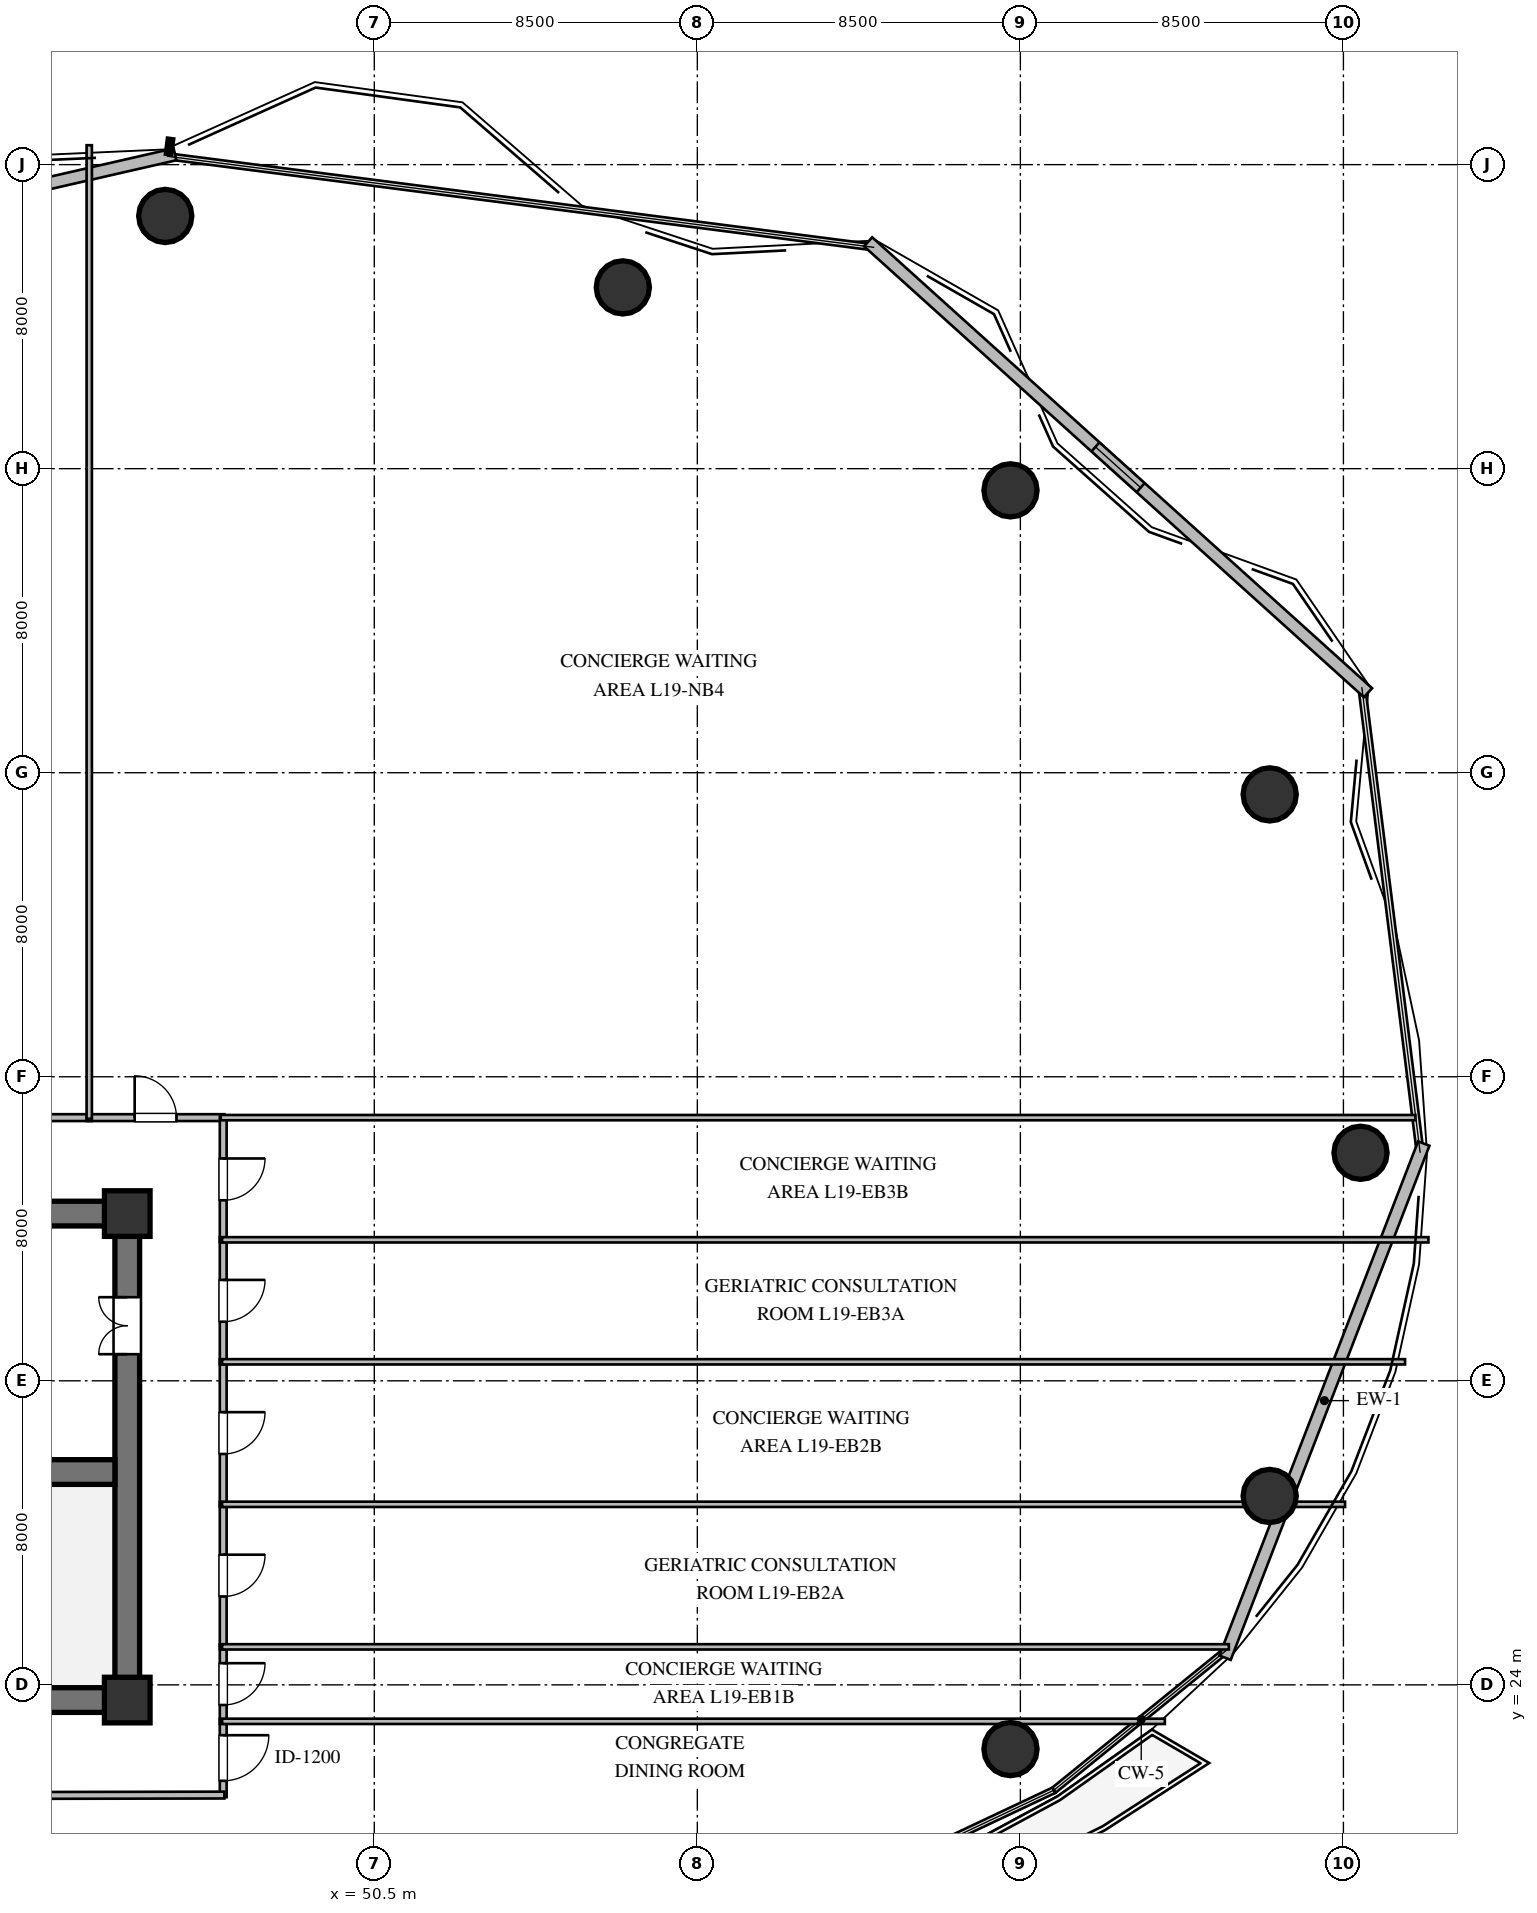
"""IFC4 building model, lengths in metres.
Left out: names, types, materials, properties, quantities, classifications, styles, units other than length and angle.
Written with IfcOpenShell. Run it as: python <this file> out.ifc"""

import sys

from ifc_helpers import new_model, si_unit, direction, frame, frame_2d, origin, origin_2d, place, context, subcontext, project, spatial, rectangle, circle, extrude, element, fill, save


model = new_model("IFC4")
c1 = context("Model", 3, precision=1e-05, world=origin(), true_north=direction((0.0, 1.0)))
c2 = subcontext(c1, "Body", "Model", "MODEL_VIEW")
j1 = project(units=[si_unit("LENGTHUNIT", "METRE"), si_unit("PLANEANGLEUNIT", "RADIAN")], contexts=[c1])
p1 = place(None, origin())
s1 = spatial("IfcSite", under=j1, at=p1, CompositionType="ELEMENT")
p2 = place(p1, origin())
s2 = spatial("IfcBuilding", under=s1, at=p2, CompositionType="ELEMENT")
p3 = place(p2, frame((0.0, 0.0, 74.4)))
s3 = spatial("IfcBuildingStorey", under=s2, at=p3, CompositionType="ELEMENT", Elevation=74.4)
for number, where, z_axis, x_axis in (
    (1, (21.675, 23.6, 0.0), (0.0, 0.0, 1.0), (1.0, 0.0, 0.0)),
    (2, (21.675, 36.4, 0.0), (0.0, 0.0, 1.0), (1.0, 0.0, 0.0)),
):
    element("IfcWall", number, at=place(p3, frame(where, z_axis=z_axis, x_axis=x_axis)), inside=s3, PredefinedType="SHEAR", context=c2, shape_type="SweptSolid", body=[
        extrude(rectangle(XDim=22.65, YDim=0.65, at=frame_2d((11.325, 0.0))), origin(), (0.0, 0.0, 1.0), 3.36),
    ])
p4 = place(p3, frame((44.0, 23.925, 0.0), z_axis=(0.0, 0.0, 1.0), x_axis=(0.0, 1.0, 0.0)))
e3 = element("IfcWall", 3, at=p4, inside=s3, PredefinedType="SHEAR", context=c2, shape_type="SweptSolid", body=[
    extrude(rectangle(XDim=12.15, YDim=0.65, at=frame_2d((6.075, 0.0))), origin(), (0.0, 0.0, 1.0), 3.36),
])
p5 = place(p4, frame((8.775, 0.0, 0.0)))
e4 = element("IfcOpeningElement", 4, at=p5, cuts=e3, PredefinedType="OPENING", context=c2, shape_type="SweptSolid", body=[
    extrude(rectangle(XDim=1.5, YDim=2.15, at=frame_2d((0.75, 1.075))), frame((0.0, 0.335, 0.0), z_axis=(0.0, -1.0, 0.0), x_axis=(1.0, 0.0, 0.0)), (0.0, 0.0, 1.0), 0.67),
])
p6 = place(p3, frame((22.325, 29.6, 0.0), z_axis=(0.0, 0.0, 1.0), x_axis=(1.0, 0.0, 0.0)))
e5 = element("IfcWall", 5, at=p6, inside=s3, PredefinedType="SHEAR", context=c2, shape_type="SweptSolid", body=[
    extrude(rectangle(XDim=21.35, YDim=0.65, at=frame_2d((10.675, 0.0))), origin(), (0.0, 0.0, 1.0), 3.36),
])
p7 = place(p6, frame((12.125, 0.0, 0.0)))
e6 = element("IfcOpeningElement", 6, at=p7, cuts=e5, PredefinedType="OPENING", context=c2, shape_type="SweptSolid", body=[
    extrude(rectangle(XDim=1.15, YDim=2.1, at=frame_2d((0.575, 1.05))), frame((0.0, 0.335, 0.0), z_axis=(0.0, -1.0, 0.0), x_axis=(1.0, 0.0, 0.0)), (0.0, 0.0, 1.0), 0.67),
])
for number, where, z_axis, x_axis in (
    (7, (44.0, 23.6, 0.0), (0.0, 0.0, 1.0), (1.0, 0.0, 0.0)),
    (8, (44.0, 36.4, 0.0), (0.0, 0.0, 1.0), (1.0, 0.0, 0.0)),
):
    element("IfcColumn", number, at=place(p3, frame(where, z_axis=z_axis, x_axis=x_axis)), inside=s3, PredefinedType="COLUMN", context=c2, shape_type="SweptSolid", body=[
        extrude(rectangle(XDim=1.2, YDim=1.2, at=origin_2d()), origin(), (0.0, 0.0, 1.0), 3.6),
    ])
for number, where, z_axis, x_axis in (
    (9, (76.45, 38.0, 0.0), (0.0, 0.0, 1.0), (1.0, 0.0, 0.0)),
    (10, (74.06, 47.43, 0.0), (0.0, 0.0, 1.0), (1.0, 0.0, 0.0)),
    (11, (67.24, 55.43, 0.0), (0.0, 0.0, 1.0), (1.0, 0.0, 0.0)),
    (12, (57.04, 60.77, 0.0), (0.0, 0.0, 1.0), (1.0, 0.0, 0.0)),
    (13, (45.0, 62.65, 0.0), (0.0, 0.0, 1.0), (1.0, 0.0, 0.0)),
    (14, (67.24, 22.31, 0.0), (0.0, 0.0, 1.0), (1.0, 0.0, 0.0)),
    (15, (74.06, 28.97, 0.0), (0.0, 0.0, 1.0), (1.0, 0.0, 0.0)),
):
    element("IfcColumn", number, at=place(p3, frame(where, z_axis=z_axis, x_axis=x_axis)), inside=s3, PredefinedType="COLUMN", context=c2, shape_type="SweptSolid", body=[
        extrude(circle(Radius=0.7, at=origin_2d()), origin(), (0.0, 0.0, 1.0), 3.6),
    ])
p8 = place(p3, frame((78.114, 38.243, 0.0), z_axis=(0.0, 0.0, 1.0), x_axis=(-0.360517110943, -0.932752599952, 0.0)))
e16 = element("IfcWall", 16, at=p8, inside=s3, PredefinedType="STANDARD", context=c2, shape_type="SweptSolid", body=[
    extrude(rectangle(XDim=14.504, YDim=0.32, at=frame_2d((7.252, 0.0))), origin(), (0.0, 0.0, 1.0), 2.738),
])
p9 = place(p3, frame((27.164, 60.126, 0.0), z_axis=(0.0, 0.0, 1.0), x_axis=(0.974744906433, 0.22332122018, 0.0)))
e17 = element("IfcWall", 17, at=p9, inside=s3, PredefinedType="STANDARD", context=c2, shape_type="SweptSolid", body=[
    extrude(rectangle(XDim=18.561, YDim=0.32, at=frame_2d((9.28, 0.0))), origin(), (0.0, 0.0, 1.0), 3.36),
])
p10 = place(p9, frame((8.481, 0.0, 1.05)))
e18 = element("IfcOpeningElement", 18, at=p10, cuts=e17, PredefinedType="OPENING", context=c2, shape_type="SweptSolid", body=[
    extrude(rectangle(XDim=1.6, YDim=1.5, at=frame_2d((0.8, 0.75))), frame((0.0, 0.17, 0.0), z_axis=(0.0, -1.0, 0.0), x_axis=(1.0, 0.0, 0.0)), (0.0, 0.0, 1.0), 0.34),
])
p11 = place(p3, frame((63.494, 61.969, 0.0), z_axis=(0.0, 0.0, 1.0), x_axis=(0.7425569544, -0.669782927128, 0.0)))
e19 = element("IfcWall", 19, at=p11, inside=s3, PredefinedType="STANDARD", context=c2, shape_type="SweptSolid", body=[
    extrude(rectangle(XDim=17.713, YDim=0.32, at=frame_2d((8.856, 0.0))), origin(), (0.0, 0.0, 1.0), 3.36),
])
p12 = place(p11, frame((8.057, 0.0, 1.05)))
e20 = element("IfcOpeningElement", 20, at=p12, cuts=e19, PredefinedType="OPENING", context=c2, shape_type="SweptSolid", body=[
    extrude(rectangle(XDim=1.6, YDim=1.5, at=frame_2d((0.8, 0.75))), frame((0.0, 0.17, 0.0), z_axis=(0.0, -1.0, 0.0), x_axis=(1.0, 0.0, 0.0)), (0.0, 0.0, 1.0), 0.34),
])
p13 = place(p3, frame((37.935, 38.925, 0.0), z_axis=(0.0, 0.0, 1.0), x_axis=(1.0, 0.0, 0.0)))
e21 = element("IfcWall", 21, at=p13, inside=s3, PredefinedType="PARTITIONING", context=c2, shape_type="SweptSolid", body=[
    extrude(rectangle(XDim=5.13, YDim=0.18, at=frame_2d((2.565, 0.0))), origin(), (0.0, 0.0, 1.0), 3.36),
])
p14 = place(p13, frame((2.015, 0.0, 0.0)))
e22 = element("IfcOpeningElement", 22, at=p14, cuts=e21, PredefinedType="OPENING", context=c2, shape_type="SweptSolid", body=[
    extrude(rectangle(XDim=1.1, YDim=2.1, at=frame_2d((0.55, 1.05))), frame((0.0, 0.1, 0.0), z_axis=(0.0, -1.0, 0.0), x_axis=(1.0, 0.0, 0.0)), (0.0, 0.0, 1.0), 0.2),
])
p15 = place(p3, frame((42.935, 38.925, 0.0), z_axis=(0.0, 0.0, 1.0), x_axis=(1.0, 0.0, 0.0)))
e23 = element("IfcWall", 23, at=p15, inside=s3, PredefinedType="PARTITIONING", context=c2, shape_type="SweptSolid", body=[
    extrude(rectangle(XDim=3.62, YDim=0.18, at=frame_2d((1.81, 0.0))), origin(), (0.0, 0.0, 1.0), 3.36),
])
p16 = place(p15, frame((1.26, 0.0, 0.0)))
e24 = element("IfcOpeningElement", 24, at=p16, cuts=e23, PredefinedType="OPENING", context=c2, shape_type="SweptSolid", body=[
    extrude(rectangle(XDim=1.1, YDim=2.1, at=frame_2d((0.55, 1.05))), frame((0.0, 0.1, 0.0), z_axis=(0.0, -1.0, 0.0), x_axis=(1.0, 0.0, 0.0)), (0.0, 0.0, 1.0), 0.2),
])
p17 = place(p3, frame((46.525, 23.105, 0.0), z_axis=(0.0, 0.0, 1.0), x_axis=(0.0, -1.0, 0.0)))
e25 = element("IfcWall", 25, at=p17, inside=s3, PredefinedType="PARTITIONING", context=c2, shape_type="SweptSolid", body=[
    extrude(rectangle(XDim=2.06, YDim=0.18, at=frame_2d((1.03, 0.0))), origin(), (0.0, 0.0, 1.0), 3.36),
])
p18 = place(p17, frame((0.43, 0.0, 0.0)))
e26 = element("IfcOpeningElement", 26, at=p18, cuts=e25, PredefinedType="OPENING", context=c2, shape_type="SweptSolid", body=[
    extrude(rectangle(XDim=1.2, YDim=2.15, at=frame_2d((0.6, 1.075))), frame((0.0, 0.1, 0.0), z_axis=(0.0, -1.0, 0.0), x_axis=(1.0, 0.0, 0.0)), (0.0, 0.0, 1.0), 0.2),
])
p19 = place(p3, frame((46.525, 25.065, 0.0), z_axis=(0.0, 0.0, 1.0), x_axis=(0.0, -1.0, 0.0)))
e27 = element("IfcWall", 27, at=p19, inside=s3, PredefinedType="PARTITIONING", context=c2, shape_type="SweptSolid", body=[
    extrude(rectangle(XDim=2.09, YDim=0.18, at=frame_2d((1.045, 0.0))), origin(), (0.0, 0.0, 1.0), 3.36),
])
p20 = place(p19, frame((0.495, 0.0, 0.0)))
e28 = element("IfcOpeningElement", 28, at=p20, cuts=e27, PredefinedType="OPENING", context=c2, shape_type="SweptSolid", body=[
    extrude(rectangle(XDim=1.1, YDim=2.1, at=frame_2d((0.55, 1.05))), frame((0.0, 0.1, 0.0), z_axis=(0.0, -1.0, 0.0), x_axis=(1.0, 0.0, 0.0)), (0.0, 0.0, 1.0), 0.2),
])
p21 = place(p3, frame((46.525, 28.815, 0.0), z_axis=(0.0, 0.0, 1.0), x_axis=(0.0, -1.0, 0.0)))
e29 = element("IfcWall", 29, at=p21, inside=s3, PredefinedType="PARTITIONING", context=c2, shape_type="SweptSolid", body=[
    extrude(rectangle(XDim=3.88, YDim=0.18, at=frame_2d((1.94, 0.0))), origin(), (0.0, 0.0, 1.0), 3.36),
])
p22 = place(p21, frame((1.39, 0.0, 0.0)))
e30 = element("IfcOpeningElement", 30, at=p22, cuts=e29, PredefinedType="OPENING", context=c2, shape_type="SweptSolid", body=[
    extrude(rectangle(XDim=1.1, YDim=2.1, at=frame_2d((0.55, 1.05))), frame((0.0, 0.1, 0.0), z_axis=(0.0, -1.0, 0.0), x_axis=(1.0, 0.0, 0.0)), (0.0, 0.0, 1.0), 0.2),
])
p23 = place(p3, frame((46.525, 32.565, 0.0), z_axis=(0.0, 0.0, 1.0), x_axis=(0.0, -1.0, 0.0)))
e31 = element("IfcWall", 31, at=p23, inside=s3, PredefinedType="PARTITIONING", context=c2, shape_type="SweptSolid", body=[
    extrude(rectangle(XDim=3.88, YDim=0.18, at=frame_2d((1.94, 0.0))), origin(), (0.0, 0.0, 1.0), 3.36),
])
p24 = place(p23, frame((1.39, 0.0, 0.0)))
e32 = element("IfcOpeningElement", 32, at=p24, cuts=e31, PredefinedType="OPENING", context=c2, shape_type="SweptSolid", body=[
    extrude(rectangle(XDim=1.1, YDim=2.1, at=frame_2d((0.55, 1.05))), frame((0.0, 0.1, 0.0), z_axis=(0.0, -1.0, 0.0), x_axis=(1.0, 0.0, 0.0)), (0.0, 0.0, 1.0), 0.2),
])
p25 = place(p3, frame((46.525, 35.775, 0.0), z_axis=(0.0, 0.0, 1.0), x_axis=(0.0, -1.0, 0.0)))
e33 = element("IfcWall", 33, at=p25, inside=s3, PredefinedType="PARTITIONING", context=c2, shape_type="SweptSolid", body=[
    extrude(rectangle(XDim=3.34, YDim=0.18, at=frame_2d((1.67, 0.0))), origin(), (0.0, 0.0, 1.0), 3.36),
])
p26 = place(p25, frame((1.12, 0.0, 0.0)))
e34 = element("IfcOpeningElement", 34, at=p26, cuts=e33, PredefinedType="OPENING", context=c2, shape_type="SweptSolid", body=[
    extrude(rectangle(XDim=1.1, YDim=2.1, at=frame_2d((0.55, 1.05))), frame((0.0, 0.1, 0.0), z_axis=(0.0, -1.0, 0.0), x_axis=(1.0, 0.0, 0.0)), (0.0, 0.0, 1.0), 0.2),
])
p27 = place(p3, frame((46.525, 38.955, 0.0), z_axis=(0.0, 0.0, 1.0), x_axis=(0.0, -1.0, 0.0)))
e35 = element("IfcWall", 35, at=p27, inside=s3, PredefinedType="PARTITIONING", context=c2, shape_type="SweptSolid", body=[
    extrude(rectangle(XDim=3.31, YDim=0.18, at=frame_2d((1.655, 0.0))), origin(), (0.0, 0.0, 1.0), 3.36),
])
p28 = place(p27, frame((1.105, 0.0, 0.0)))
e36 = element("IfcOpeningElement", 36, at=p28, cuts=e35, PredefinedType="OPENING", context=c2, shape_type="SweptSolid", body=[
    extrude(rectangle(XDim=1.1, YDim=2.1, at=frame_2d((0.55, 1.05))), frame((0.0, 0.1, 0.0), z_axis=(0.0, -1.0, 0.0), x_axis=(1.0, 0.0, 0.0)), (0.0, 0.0, 1.0), 0.2),
])
p29 = place(p3, frame((46.555, 21.1, 0.0), z_axis=(0.0, 0.0, 1.0), x_axis=(-0.999998414151, -0.001780925679, 0.0)))
e37 = element("IfcWall", 37, at=p29, inside=s3, PredefinedType="PARTITIONING", context=c2, shape_type="SweptSolid", body=[
    extrude(rectangle(XDim=14.12, YDim=0.18, at=frame_2d((7.06, 0.0))), origin(), (0.0, 0.0, 1.0), 2.996),
])
p30 = place(p29, frame((6.51, 0.0, 0.0)))
e38 = element("IfcOpeningElement", 38, at=p30, cuts=e37, PredefinedType="OPENING", context=c2, shape_type="SweptSolid", body=[
    extrude(rectangle(XDim=1.1, YDim=2.1, at=frame_2d((0.55, 1.05))), frame((0.0, 0.1, 0.0), z_axis=(0.0, -1.0, 0.0), x_axis=(1.0, 0.0, 0.0)), (0.0, 0.0, 1.0), 0.2),
])
p31 = place(p3, frame((43.0, 64.511, 0.0), z_axis=(0.0, 0.0, 1.0), x_axis=(0.0, -1.0, 0.0)))
e39 = element("IfcWall", 39, at=p31, inside=s3, PredefinedType="PARTITIONING", context=c2, shape_type="SweptSolid", body=[
    extrude(rectangle(XDim=25.616, YDim=0.14, at=frame_2d((12.808, 0.0))), origin(), (0.0, 0.0, 1.0), 3.36),
])
p32 = place(p3, frame((77.894, 38.925, 0.0), z_axis=(0.0, 0.0, 1.0), x_axis=(-1.0, 0.0, 0.0)))
e40 = element("IfcWall", 40, at=p32, inside=s3, PredefinedType="PARTITIONING", context=c2, shape_type="SweptSolid", body=[
    extrude(rectangle(XDim=31.434, YDim=0.14, at=frame_2d((15.717, 0.0))), origin(), (0.0, 0.0, 1.0), 3.36),
])
p33 = place(p3, frame((46.495, 23.04, 0.0), z_axis=(0.0, 0.0, 1.0), x_axis=(1.0, 0.0, 0.0)))
e41 = element("IfcWall", 41, at=p33, inside=s3, PredefinedType="PARTITIONING", context=c2, shape_type="SweptSolid", body=[
    extrude(rectangle(XDim=24.806, YDim=0.14, at=frame_2d((12.403, 0.0))), origin(), (0.0, 0.0, 1.0), 2.89),
])
p34 = place(p3, frame((46.495, 25.0, 0.0), z_axis=(0.0, 0.0, 1.0), x_axis=(1.0, 0.0, 0.0)))
e42 = element("IfcWall", 42, at=p34, inside=s3, PredefinedType="PARTITIONING", context=c2, shape_type="SweptSolid", body=[
    extrude(rectangle(XDim=26.49, YDim=0.14, at=frame_2d((13.245, 0.0))), origin(), (0.0, 0.0, 1.0), 2.89),
])
p35 = place(p3, frame((46.495, 28.75, 0.0), z_axis=(0.0, 0.0, 1.0), x_axis=(1.0, 0.0, 0.0)))
e43 = element("IfcWall", 43, at=p35, inside=s3, PredefinedType="PARTITIONING", context=c2, shape_type="SweptSolid", body=[
    extrude(rectangle(XDim=29.548, YDim=0.14, at=frame_2d((14.774, 0.0))), origin(), (0.0, 0.0, 1.0), 2.89),
])
p36 = place(p3, frame((46.495, 32.5, 0.0), z_axis=(0.0, 0.0, 1.0), x_axis=(1.0, 0.0, 0.0)))
e44 = element("IfcWall", 44, at=p36, inside=s3, PredefinedType="PARTITIONING", context=c2, shape_type="SweptSolid", body=[
    extrude(rectangle(XDim=31.127, YDim=0.14, at=frame_2d((15.563, 0.0))), origin(), (0.0, 0.0, 1.0), 3.36),
])
p37 = place(p3, frame((46.495, 35.71, 0.0), z_axis=(0.0, 0.0, 1.0), x_axis=(1.0, 0.0, 0.0)))
e45 = element("IfcWall", 45, at=p37, inside=s3, PredefinedType="PARTITIONING", context=c2, shape_type="SweptSolid", body=[
    extrude(rectangle(XDim=31.742, YDim=0.14, at=frame_2d((15.871, 0.0))), origin(), (0.0, 0.0, 1.0), 3.36),
])
p38 = place(p12, origin())
e46 = element("IfcWindow", 46, at=p38, inside=s3, PartitioningType="SINGLE_PANEL", PredefinedType="WINDOW", context=c2, shape_type="SweptSolid", body=[
    extrude(rectangle(XDim=1.6, YDim=1.5, at=frame_2d((0.8, 0.75))), frame((0.0, 0.03, 0.0), z_axis=(0.0, -1.0, 0.0), x_axis=(1.0, 0.0, 0.0)), (0.0, 0.0, 1.0), 0.06),
])
fill(e20, e46)
p39 = place(p5, origin())
e47 = element("IfcDoor", 47, at=p39, inside=s3, OperationType="DOUBLE_DOOR_SINGLE_SWING", PredefinedType="DOOR", context=c2, shape_type="SweptSolid", body=[
    extrude(rectangle(XDim=1.5, YDim=2.15, at=frame_2d((0.75, 1.075))), frame((0.0, 0.025, 0.0), z_axis=(0.0, -1.0, 0.0), x_axis=(1.0, 0.0, 0.0)), (0.0, 0.0, 1.0), 0.05),
])
fill(e4, e47)
p40 = place(p16, origin())
e48 = element("IfcDoor", 48, at=p40, inside=s3, OperationType="SINGLE_SWING_LEFT", PredefinedType="DOOR", context=c2, shape_type="SweptSolid", body=[
    extrude(rectangle(XDim=1.1, YDim=2.1, at=frame_2d((0.55, 1.05))), frame((0.0, 0.025, 0.0), z_axis=(0.0, -1.0, 0.0), x_axis=(1.0, 0.0, 0.0)), (0.0, 0.0, 1.0), 0.05),
])
fill(e24, e48)
p41 = place(p18, origin())
e49 = element("IfcDoor", 49, at=p41, inside=s3, OperationType="SINGLE_SWING_LEFT", PredefinedType="DOOR", context=c2, shape_type="SweptSolid", body=[
    extrude(rectangle(XDim=1.2, YDim=2.15, at=frame_2d((0.6, 1.075))), frame((0.0, 0.025, 0.0), z_axis=(0.0, -1.0, 0.0), x_axis=(1.0, 0.0, 0.0)), (0.0, 0.0, 1.0), 0.05),
])
fill(e26, e49)
p42 = place(p20, origin())
e50 = element("IfcDoor", 50, at=p42, inside=s3, OperationType="SINGLE_SWING_LEFT", PredefinedType="DOOR", context=c2, shape_type="SweptSolid", body=[
    extrude(rectangle(XDim=1.1, YDim=2.1, at=frame_2d((0.55, 1.05))), frame((0.0, 0.025, 0.0), z_axis=(0.0, -1.0, 0.0), x_axis=(1.0, 0.0, 0.0)), (0.0, 0.0, 1.0), 0.05),
])
fill(e28, e50)
p43 = place(p22, origin())
e51 = element("IfcDoor", 51, at=p43, inside=s3, OperationType="SINGLE_SWING_LEFT", PredefinedType="DOOR", context=c2, shape_type="SweptSolid", body=[
    extrude(rectangle(XDim=1.1, YDim=2.1, at=frame_2d((0.55, 1.05))), frame((0.0, 0.025, 0.0), z_axis=(0.0, -1.0, 0.0), x_axis=(1.0, 0.0, 0.0)), (0.0, 0.0, 1.0), 0.05),
])
fill(e30, e51)
p44 = place(p24, origin())
e52 = element("IfcDoor", 52, at=p44, inside=s3, OperationType="SINGLE_SWING_LEFT", PredefinedType="DOOR", context=c2, shape_type="SweptSolid", body=[
    extrude(rectangle(XDim=1.1, YDim=2.1, at=frame_2d((0.55, 1.05))), frame((0.0, 0.025, 0.0), z_axis=(0.0, -1.0, 0.0), x_axis=(1.0, 0.0, 0.0)), (0.0, 0.0, 1.0), 0.05),
])
fill(e32, e52)
p45 = place(p26, origin())
e53 = element("IfcDoor", 53, at=p45, inside=s3, OperationType="SINGLE_SWING_LEFT", PredefinedType="DOOR", context=c2, shape_type="SweptSolid", body=[
    extrude(rectangle(XDim=1.1, YDim=2.1, at=frame_2d((0.55, 1.05))), frame((0.0, 0.025, 0.0), z_axis=(0.0, -1.0, 0.0), x_axis=(1.0, 0.0, 0.0)), (0.0, 0.0, 1.0), 0.05),
])
fill(e34, e53)
p46 = place(p28, origin())
e54 = element("IfcDoor", 54, at=p46, inside=s3, OperationType="SINGLE_SWING_LEFT", PredefinedType="DOOR", context=c2, shape_type="SweptSolid", body=[
    extrude(rectangle(XDim=1.1, YDim=2.1, at=frame_2d((0.55, 1.05))), frame((0.0, 0.025, 0.0), z_axis=(0.0, -1.0, 0.0), x_axis=(1.0, 0.0, 0.0)), (0.0, 0.0, 1.0), 0.05),
])
fill(e36, e54)
save(model, sys.argv[1])
